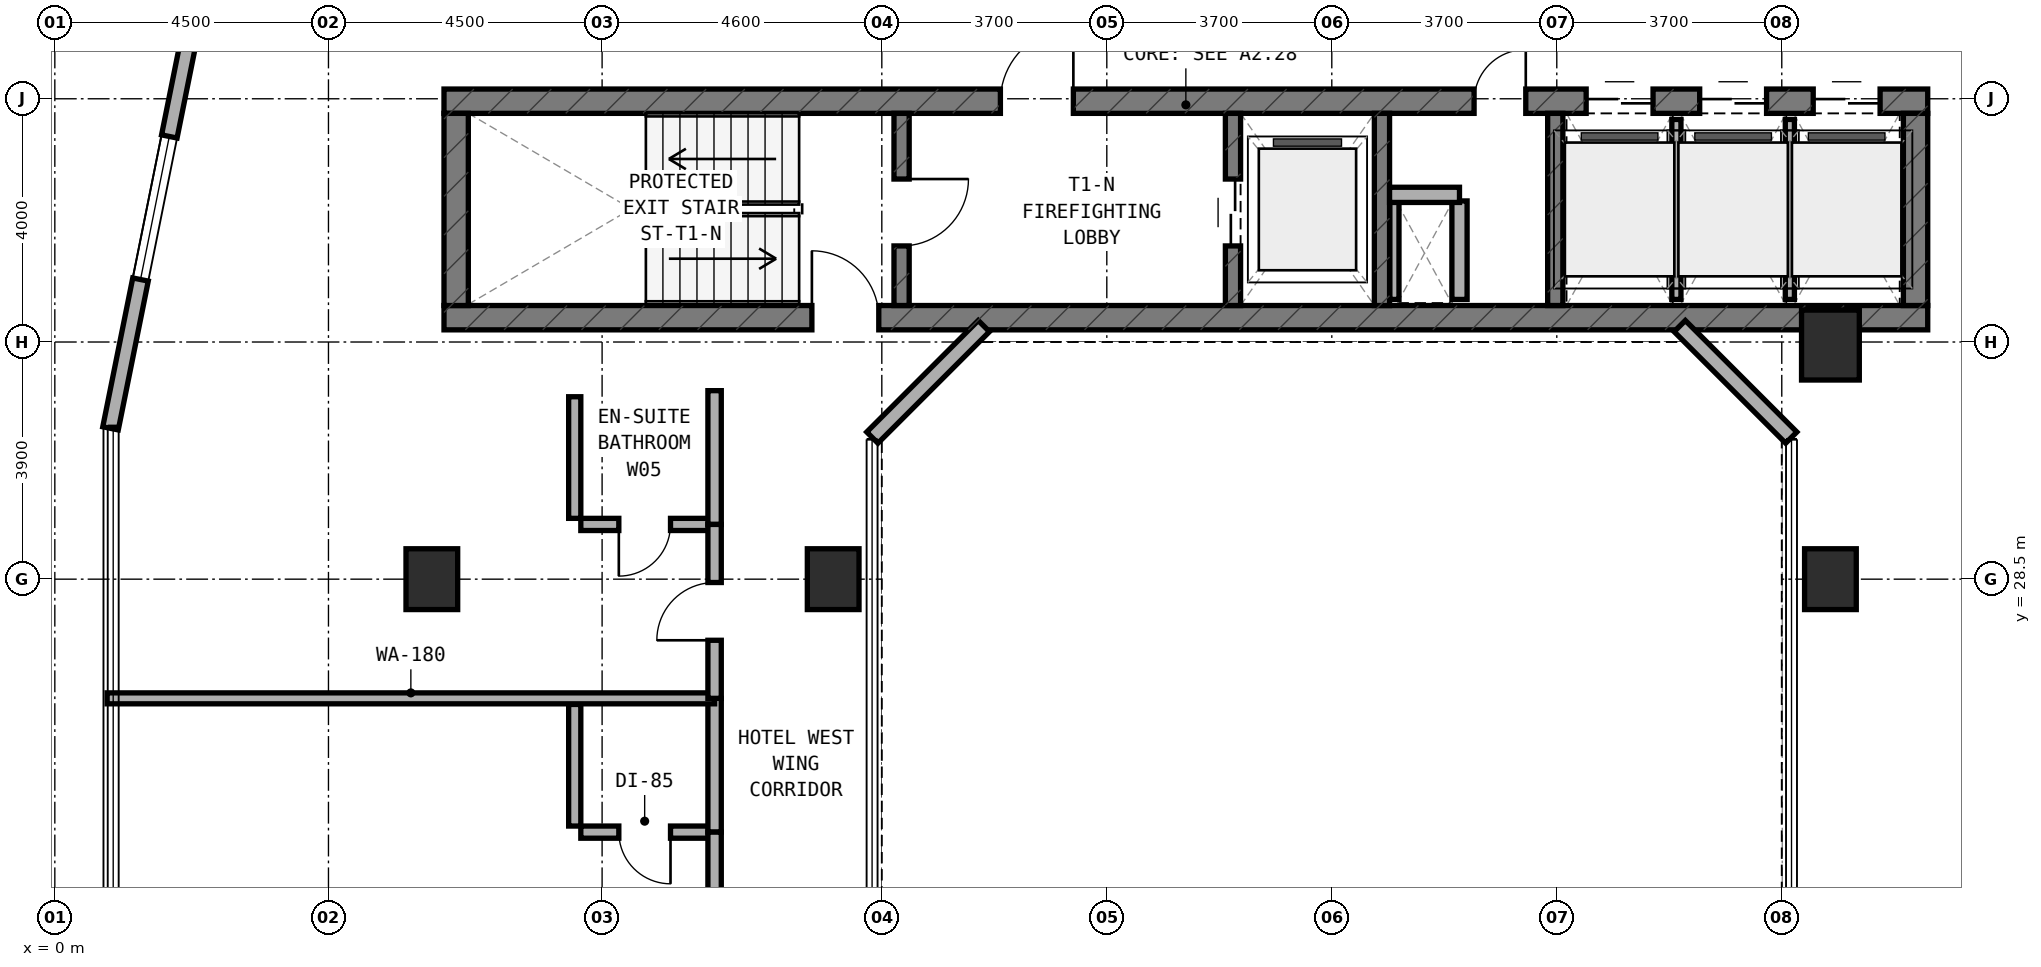
"""IFC4 building model, lengths in metres.
Left out: names, types, materials, properties, quantities, classifications, styles, units other than length and angle.
Written with IfcOpenShell. Run it as: python <this file> out.ifc"""

import sys

from ifc_helpers import new_model, si_unit, direction, frame, frame_2d, origin, origin_2d, place, context, subcontext, project, spatial, rectangle, extrude, element, fill, save


model = new_model("IFC4")
c1 = context("Model", 3, precision=1e-05, world=origin(), true_north=direction((0.0, 1.0)))
c2 = subcontext(c1, "Body", "Model", "MODEL_VIEW")
j1 = project(units=[si_unit("LENGTHUNIT", "METRE"), si_unit("PLANEANGLEUNIT", "RADIAN")], contexts=[c1])
p1 = place(None, origin())
s1 = spatial("IfcSite", under=j1, at=p1, CompositionType="ELEMENT")
p2 = place(p1, origin())
s2 = spatial("IfcBuilding", under=s1, at=p2, CompositionType="ELEMENT")
p3 = place(p2, frame((0.0, 0.0, 124.0)))
s3 = spatial("IfcBuildingStorey", under=s2, at=p3, CompositionType="ELEMENT", Elevation=124.0)
p4 = place(p3, frame((6.4, 32.8, 0.0), z_axis=(0.0, 0.0, 1.0), x_axis=(1.0, 0.0, 0.0)))
e1 = element("IfcWall", 1, at=p4, inside=s3, PredefinedType="SHEAR", context=c2, shape_type="SweptSolid", body=[
    extrude(rectangle(XDim=24.4, YDim=0.4, at=frame_2d((12.2, 0.0))), origin(), (0.0, 0.0, 1.0), 3.5),
])
p5 = place(p4, frame((6.05, 0.0, 0.0)))
e2 = element("IfcOpeningElement", 2, at=p5, cuts=e1, PredefinedType="OPENING", context=c2, shape_type="SweptSolid", body=[
    extrude(rectangle(XDim=1.1, YDim=2.15, at=frame_2d((0.55, 1.075))), frame((0.0, 0.21, 0.0), z_axis=(0.0, -1.0, 0.0), x_axis=(1.0, 0.0, 0.0)), (0.0, 0.0, 1.0), 0.42),
])
p6 = place(p3, frame((6.4, 36.36, 0.0), z_axis=(0.0, 0.0, 1.0), x_axis=(1.0, 0.0, 0.0)))
e3 = element("IfcWall", 3, at=p6, inside=s3, PredefinedType="SHEAR", context=c2, shape_type="SweptSolid", body=[
    extrude(rectangle(XDim=24.4, YDim=0.4, at=frame_2d((12.2, 0.0))), origin(), (0.0, 0.0, 1.0), 3.5),
])
p7 = place(p6, frame((9.15, 0.0, 0.0)))
e4 = element("IfcOpeningElement", 4, at=p7, cuts=e3, PredefinedType="OPENING", context=c2, shape_type="SweptSolid", body=[
    extrude(rectangle(XDim=1.2, YDim=2.15, at=frame_2d((0.6, 1.075))), frame((0.0, 0.21, 0.0), z_axis=(0.0, -1.0, 0.0), x_axis=(1.0, 0.0, 0.0)), (0.0, 0.0, 1.0), 0.42),
])
p8 = place(p6, frame((16.94, 0.0, 0.0)))
e5 = element("IfcOpeningElement", 5, at=p8, cuts=e3, PredefinedType="OPENING", context=c2, shape_type="SweptSolid", body=[
    extrude(rectangle(XDim=0.85, YDim=2.1, at=frame_2d((0.425, 1.05))), frame((0.0, 0.21, 0.0), z_axis=(0.0, -1.0, 0.0), x_axis=(1.0, 0.0, 0.0)), (0.0, 0.0, 1.0), 0.42),
])
p9 = place(p6, frame((18.783, 0.0, 0.0)))
e6 = element("IfcOpeningElement", 6, at=p9, cuts=e3, PredefinedType="OPENING", context=c2, shape_type="SweptSolid", body=[
    extrude(rectangle(XDim=1.1, YDim=2.15, at=frame_2d((0.55, 1.075))), frame((0.0, 0.21, 0.0), z_axis=(0.0, -1.0, 0.0), x_axis=(1.0, 0.0, 0.0)), (0.0, 0.0, 1.0), 0.42),
])
p10 = place(p6, frame((20.65, 0.0, 0.0)))
e7 = element("IfcOpeningElement", 7, at=p10, cuts=e3, PredefinedType="OPENING", context=c2, shape_type="SweptSolid", body=[
    extrude(rectangle(XDim=1.1, YDim=2.15, at=frame_2d((0.55, 1.075))), frame((0.0, 0.21, 0.0), z_axis=(0.0, -1.0, 0.0), x_axis=(1.0, 0.0, 0.0)), (0.0, 0.0, 1.0), 0.42),
])
p11 = place(p6, frame((22.517, 0.0, 0.0)))
e8 = element("IfcOpeningElement", 8, at=p11, cuts=e3, PredefinedType="OPENING", context=c2, shape_type="SweptSolid", body=[
    extrude(rectangle(XDim=1.1, YDim=2.15, at=frame_2d((0.55, 1.075))), frame((0.0, 0.21, 0.0), z_axis=(0.0, -1.0, 0.0), x_axis=(1.0, 0.0, 0.0)), (0.0, 0.0, 1.0), 0.42),
])
for number, where, z_axis, x_axis in (
    (9, (6.6, 33.0, 0.0), (0.0, 0.0, 1.0), (0.0, 1.0, 0.0)),
    (10, (30.6, 33.0, 0.0), (0.0, 0.0, 1.0), (0.0, 1.0, 0.0)),
):
    element("IfcWall", number, at=place(p3, frame(where, z_axis=z_axis, x_axis=x_axis)), inside=s3, PredefinedType="SHEAR", context=c2, shape_type="SweptSolid", body=[
        extrude(rectangle(XDim=3.16, YDim=0.4, at=frame_2d((1.58, 0.0))), origin(), (0.0, 0.0, 1.0), 3.5),
    ])
p12 = place(p3, frame((13.925, 33.0, 0.0), z_axis=(0.0, 0.0, 1.0), x_axis=(0.0, 1.0, 0.0)))
e11 = element("IfcWall", 11, at=p12, inside=s3, PredefinedType="STANDARD", context=c2, shape_type="SweptSolid", body=[
    extrude(rectangle(XDim=3.16, YDim=0.25, at=frame_2d((1.58, 0.0))), origin(), (0.0, 0.0, 1.0), 3.22),
])
p13 = place(p12, frame((0.98, 0.0, 0.0)))
e12 = element("IfcOpeningElement", 12, at=p13, cuts=e11, PredefinedType="OPENING", context=c2, shape_type="SweptSolid", body=[
    extrude(rectangle(XDim=1.1, YDim=2.15, at=frame_2d((0.55, 1.075))), frame((0.0, 0.135, 0.0), z_axis=(0.0, -1.0, 0.0), x_axis=(1.0, 0.0, 0.0)), (0.0, 0.0, 1.0), 0.27),
])
p14 = place(p3, frame((19.375, 33.0, 0.0), z_axis=(0.0, 0.0, 1.0), x_axis=(0.0, 1.0, 0.0)))
e13 = element("IfcWall", 13, at=p14, inside=s3, PredefinedType="STANDARD", context=c2, shape_type="SweptSolid", body=[
    extrude(rectangle(XDim=3.16, YDim=0.25, at=frame_2d((1.58, 0.0))), origin(), (0.0, 0.0, 1.0), 3.22),
])
p15 = place(p14, frame((0.98, 0.0, 0.0)))
e14 = element("IfcOpeningElement", 14, at=p15, cuts=e13, PredefinedType="OPENING", context=c2, shape_type="SweptSolid", body=[
    extrude(rectangle(XDim=1.1, YDim=2.15, at=frame_2d((0.55, 1.075))), frame((0.0, 0.135, 0.0), z_axis=(0.0, -1.0, 0.0), x_axis=(1.0, 0.0, 0.0)), (0.0, 0.0, 1.0), 0.27),
])
for number, where, z_axis, x_axis in (
    (15, (21.825, 33.0, 0.0), (0.0, 0.0, 1.0), (0.0, 1.0, 0.0)),
    (16, (24.675, 33.0, 0.0), (0.0, 0.0, 1.0), (0.0, 1.0, 0.0)),
):
    element("IfcWall", number, at=place(p3, frame(where, z_axis=z_axis, x_axis=x_axis)), inside=s3, PredefinedType="STANDARD", context=c2, shape_type="SweptSolid", body=[
        extrude(rectangle(XDim=3.16, YDim=0.25, at=frame_2d((1.58, 0.0))), origin(), (0.0, 0.0, 1.0), 3.22),
    ])
for number, where, z_axis, x_axis in (
    (17, (6.2, 28.5, 0.0), (0.0, 0.0, 1.0), (1.0, 0.0, 0.0)),
    (18, (12.8, 28.5, 0.0), (0.0, 0.0, 1.0), (1.0, 0.0, 0.0)),
):
    element("IfcColumn", number, at=place(p3, frame(where, z_axis=z_axis, x_axis=x_axis)), inside=s3, PredefinedType="COLUMN", context=c2, shape_type="SweptSolid", body=[
        extrude(rectangle(XDim=0.85, YDim=1.0, at=origin_2d()), origin(), (0.0, 0.0, 1.0), 3.5),
    ])
p16 = place(p3, frame((29.2, 32.35, 0.0), z_axis=(0.0, 0.0, 1.0), x_axis=(1.0, 0.0, 0.0)))
e19 = element("IfcColumn", 19, at=p16, inside=s3, PredefinedType="COLUMN", context=c2, shape_type="SweptSolid", body=[
    extrude(rectangle(XDim=0.95, YDim=1.15, at=origin_2d()), origin(), (0.0, 0.0, 1.0), 3.5),
])
p17 = place(p3, frame((29.2, 28.5, 0.0), z_axis=(0.0, 0.0, 1.0), x_axis=(1.0, 0.0, 0.0)))
e20 = element("IfcColumn", 20, at=p17, inside=s3, PredefinedType="COLUMN", context=c2, shape_type="SweptSolid", body=[
    extrude(rectangle(XDim=0.85, YDim=1.0, at=origin_2d()), origin(), (0.0, 0.0, 1.0), 3.5),
])
p18 = place(p3, frame((2.729, 39.982, 0.0), z_axis=(0.0, 0.0, 1.0), x_axis=(-0.197435082048, -0.980315963543, 0.0)))
e21 = element("IfcWall", 21, at=p18, inside=s3, PredefinedType="STANDARD", context=c2, shape_type="SweptSolid", body=[
    extrude(rectangle(XDim=9.183, YDim=0.26, at=frame_2d((4.591, 0.0))), origin(), (0.0, 0.0, 1.0), 3.22),
])
p19 = place(p18, frame((4.286, 0.0, 0.8)))
e22 = element("IfcOpeningElement", 22, at=p19, cuts=e21, PredefinedType="OPENING", context=c2, shape_type="SweptSolid", body=[
    extrude(rectangle(XDim=2.4, YDim=1.6, at=frame_2d((1.2, 0.8))), frame((0.0, 0.14, 0.0), z_axis=(0.0, -1.0, 0.0), x_axis=(1.0, 0.0, 0.0)), (0.0, 0.0, 1.0), 0.28),
])
for number, where, z_axis, x_axis in (
    (23, (28.556, 30.828, 0.0), (0.0, 0.0, 1.0), (-0.707, 0.707, 0.0)),
    (24, (15.278, 32.662, 0.0), (0.0, 0.0, 1.0), (-0.707, -0.707, 0.0)),
):
    element("IfcWall", number, at=place(p3, frame(where, z_axis=z_axis, x_axis=x_axis)), inside=s3, PredefinedType="STANDARD", context=c2, shape_type="SweptSolid", body=[
        extrude(rectangle(XDim=2.594, YDim=0.26, at=frame_2d((1.297, 0.0))), origin(), (0.0, 0.0, 1.0), 3.22),
    ])
p20 = place(p3, frame((22.03, 33.1, 0.0), z_axis=(0.0, 0.0, 1.0), x_axis=(0.0, 1.0, 0.0)))
e25 = element("IfcWall", 25, at=p20, inside=s3, PredefinedType="PARTITIONING", context=c2, shape_type="SweptSolid", body=[
    extrude(rectangle(XDim=1.62, YDim=0.15, at=frame_2d((0.81, 0.0))), origin(), (0.0, 0.0, 1.0), 3.22),
])
p21 = place(p3, frame((23.1, 33.1, 0.0), z_axis=(0.0, 0.0, 1.0), x_axis=(0.0, 1.0, 0.0)))
e26 = element("IfcWall", 26, at=p21, inside=s3, PredefinedType="SOLIDWALL", context=c2, shape_type="SweptSolid", body=[
    extrude(rectangle(XDim=1.62, YDim=0.25, at=frame_2d((0.81, 0.0))), origin(), (0.0, 0.0, 1.0), 3.22),
])
p22 = place(p3, frame((21.95, 34.82, 0.0), z_axis=(0.0, 0.0, 1.0), x_axis=(1.0, 0.0, 0.0)))
e27 = element("IfcWall", 27, at=p22, inside=s3, PredefinedType="SOLIDWALL", context=c2, shape_type="SweptSolid", body=[
    extrude(rectangle(XDim=1.15, YDim=0.25, at=frame_2d((0.575, 0.0))), origin(), (0.0, 0.0, 1.0), 3.22),
])
p23 = place(p3, frame((26.667, 33.1, 0.0), z_axis=(0.0, 0.0, 1.0), x_axis=(0.0, 1.0, 0.0)))
e28 = element("IfcWall", 28, at=p23, inside=s3, PredefinedType="PARTITIONING", context=c2, shape_type="SweptSolid", body=[
    extrude(rectangle(XDim=2.96, YDim=0.15, at=frame_2d((1.48, 0.0))), origin(), (0.0, 0.0, 1.0), 3.22),
])
p24 = place(p3, frame((28.533, 33.1, 0.0), z_axis=(0.0, 0.0, 1.0), x_axis=(0.0, 1.0, 0.0)))
e29 = element("IfcWall", 29, at=p24, inside=s3, PredefinedType="PARTITIONING", context=c2, shape_type="SweptSolid", body=[
    extrude(rectangle(XDim=2.96, YDim=0.15, at=frame_2d((1.48, 0.0))), origin(), (0.0, 0.0, 1.0), 2.695),
])
p25 = place(p3, frame((8.65, 24.34, 0.0), z_axis=(0.0, 0.0, 1.0), x_axis=(1.0, 0.0, 0.0)))
e30 = element("IfcWall", 30, at=p25, inside=s3, PredefinedType="PLUMBINGWALL", context=c2, shape_type="SweptSolid", body=[
    extrude(rectangle(XDim=2.1, YDim=0.2, at=frame_2d((1.05, 0.0))), origin(), (0.0, 0.0, 1.0), 3.22),
])
p26 = place(p25, frame((0.625, 0.0, 0.0)))
e31 = element("IfcOpeningElement", 31, at=p26, cuts=e30, PredefinedType="OPENING", context=c2, shape_type="SweptSolid", body=[
    extrude(rectangle(XDim=0.85, YDim=2.1, at=frame_2d((0.425, 1.05))), frame((0.0, 0.11, 0.0), z_axis=(0.0, -1.0, 0.0), x_axis=(1.0, 0.0, 0.0)), (0.0, 0.0, 1.0), 0.22),
])
p27 = place(p3, frame((8.55, 24.44, 0.0), z_axis=(0.0, 0.0, 1.0), x_axis=(0.0, 1.0, 0.0)))
e32 = element("IfcWall", 32, at=p27, inside=s3, PredefinedType="PLUMBINGWALL", context=c2, shape_type="SweptSolid", body=[
    extrude(rectangle(XDim=2.0, YDim=0.2, at=frame_2d((1.0, 0.0))), origin(), (0.0, 0.0, 1.0), 3.22),
])
p28 = place(p3, frame((10.85, 24.34, 0.0), z_axis=(0.0, 0.0, 1.0), x_axis=(0.0, 1.0, 0.0)))
e33 = element("IfcWall", 33, at=p28, inside=s3, PredefinedType="SOLIDWALL", context=c2, shape_type="SweptSolid", body=[
    extrude(rectangle(XDim=2.2, YDim=0.22, at=frame_2d((1.1, 0.0))), origin(), (0.0, 0.0, 1.0), 3.22),
])
p29 = place(p3, frame((10.85, 18.4, 0.0), z_axis=(0.0, 0.0, 1.0), x_axis=(0.0, 1.0, 0.0)))
e34 = element("IfcWall", 34, at=p29, inside=s3, PredefinedType="SOLIDWALL", context=c2, shape_type="SweptSolid", body=[
    extrude(rectangle(XDim=5.94, YDim=0.22, at=frame_2d((2.97, 0.0))), origin(), (0.0, 0.0, 1.0), 2.695),
])
p30 = place(p29, frame((2.495, 0.0, 0.0)))
e35 = element("IfcOpeningElement", 35, at=p30, cuts=e34, PredefinedType="OPENING", context=c2, shape_type="SweptSolid", body=[
    extrude(rectangle(XDim=0.95, YDim=2.1, at=frame_2d((0.475, 1.05))), frame((0.0, 0.12, 0.0), z_axis=(0.0, -1.0, 0.0), x_axis=(1.0, 0.0, 0.0)), (0.0, 0.0, 1.0), 0.24),
])
p31 = place(p3, frame((0.86, 26.54, 0.0), z_axis=(0.0, 0.0, 1.0), x_axis=(1.0, 0.0, 0.0)))
e36 = element("IfcWall", 36, at=p31, inside=s3, PredefinedType="SOLIDWALL", context=c2, shape_type="SweptSolid", body=[
    extrude(rectangle(XDim=9.99, YDim=0.18, at=frame_2d((4.995, 0.0))), origin(), (0.0, 0.0, 1.0), 2.835),
])
p32 = place(p3, frame((8.65, 29.4, 0.0), z_axis=(0.0, 0.0, 1.0), x_axis=(1.0, 0.0, 0.0)))
e37 = element("IfcWall", 37, at=p32, inside=s3, PredefinedType="PLUMBINGWALL", context=c2, shape_type="SweptSolid", body=[
    extrude(rectangle(XDim=2.1, YDim=0.2, at=frame_2d((1.05, 0.0))), origin(), (0.0, 0.0, 1.0), 3.22),
])
p33 = place(p32, frame((0.625, 0.0, 0.0)))
e38 = element("IfcOpeningElement", 38, at=p33, cuts=e37, PredefinedType="OPENING", context=c2, shape_type="SweptSolid", body=[
    extrude(rectangle(XDim=0.85, YDim=2.1, at=frame_2d((0.425, 1.05))), frame((0.0, 0.11, 0.0), z_axis=(0.0, -1.0, 0.0), x_axis=(1.0, 0.0, 0.0)), (0.0, 0.0, 1.0), 0.22),
])
p34 = place(p3, frame((8.55, 29.5, 0.0), z_axis=(0.0, 0.0, 1.0), x_axis=(0.0, 1.0, 0.0)))
e39 = element("IfcWall", 39, at=p34, inside=s3, PredefinedType="PLUMBINGWALL", context=c2, shape_type="SweptSolid", body=[
    extrude(rectangle(XDim=2.0, YDim=0.2, at=frame_2d((1.0, 0.0))), origin(), (0.0, 0.0, 1.0), 3.22),
])
p35 = place(p3, frame((10.85, 29.4, 0.0), z_axis=(0.0, 0.0, 1.0), x_axis=(0.0, 1.0, 0.0)))
e40 = element("IfcWall", 40, at=p35, inside=s3, PredefinedType="SOLIDWALL", context=c2, shape_type="SweptSolid", body=[
    extrude(rectangle(XDim=2.2, YDim=0.22, at=frame_2d((1.1, 0.0))), origin(), (0.0, 0.0, 1.0), 3.22),
])
p36 = place(p3, frame((10.85, 26.54, 0.0), z_axis=(0.0, 0.0, 1.0), x_axis=(0.0, 1.0, 0.0)))
e41 = element("IfcWall", 41, at=p36, inside=s3, PredefinedType="SOLIDWALL", context=c2, shape_type="SweptSolid", body=[
    extrude(rectangle(XDim=2.86, YDim=0.22, at=frame_2d((1.43, 0.0))), origin(), (0.0, 0.0, 1.0), 2.695),
])
p37 = place(p36, frame((0.955, 0.0, 0.0)))
e42 = element("IfcOpeningElement", 42, at=p37, cuts=e41, PredefinedType="OPENING", context=c2, shape_type="SweptSolid", body=[
    extrude(rectangle(XDim=0.95, YDim=2.1, at=frame_2d((0.475, 1.05))), frame((0.0, 0.12, 0.0), z_axis=(0.0, -1.0, 0.0), x_axis=(1.0, 0.0, 0.0)), (0.0, 0.0, 1.0), 0.24),
])
p38 = place(p19, origin())
e43 = element("IfcWindow", 43, at=p38, inside=s3, PartitioningType="SINGLE_PANEL", PredefinedType="WINDOW", context=c2, shape_type="SweptSolid", body=[
    extrude(rectangle(XDim=2.4, YDim=1.6, at=frame_2d((1.2, 0.8))), frame((0.0, 0.03, 0.0), z_axis=(0.0, -1.0, 0.0), x_axis=(1.0, 0.0, 0.0)), (0.0, 0.0, 1.0), 0.06),
])
fill(e22, e43)
p39 = place(p13, frame((1.1, 0.0, 0.0), z_axis=(0.0, 0.0, 1.0), x_axis=(-1.0, 0.0, 0.0)))
e44 = element("IfcDoor", 44, at=p39, inside=s3, OperationType="SINGLE_SWING_LEFT", PredefinedType="DOOR", context=c2, shape_type="SweptSolid", body=[
    extrude(rectangle(XDim=1.1, YDim=2.15, at=frame_2d((0.55, 1.075))), frame((0.0, 0.025, 0.0), z_axis=(0.0, -1.0, 0.0), x_axis=(1.0, 0.0, 0.0)), (0.0, 0.0, 1.0), 0.05),
])
fill(e12, e44)
p40 = place(p7, origin())
e45 = element("IfcDoor", 45, at=p40, inside=s3, OperationType="SINGLE_SWING_RIGHT", PredefinedType="DOOR", context=c2, shape_type="SweptSolid", body=[
    extrude(rectangle(XDim=1.2, YDim=2.15, at=frame_2d((0.6, 1.075))), frame((0.0, 0.025, 0.0), z_axis=(0.0, -1.0, 0.0), x_axis=(1.0, 0.0, 0.0)), (0.0, 0.0, 1.0), 0.05),
])
fill(e4, e45)
p41 = place(p15, origin())
e46 = element("IfcDoor", 46, at=p41, inside=s3, OperationType="DOUBLE_DOOR_SLIDING", PredefinedType="DOOR", context=c2, shape_type="SweptSolid", body=[
    extrude(rectangle(XDim=1.1, YDim=2.15, at=frame_2d((0.55, 1.075))), frame((0.0, 0.025, 0.0), z_axis=(0.0, -1.0, 0.0), x_axis=(1.0, 0.0, 0.0)), (0.0, 0.0, 1.0), 0.05),
])
fill(e14, e46)
p42 = place(p8, origin())
e47 = element("IfcDoor", 47, at=p42, inside=s3, OperationType="SINGLE_SWING_RIGHT", PredefinedType="DOOR", context=c2, shape_type="SweptSolid", body=[
    extrude(rectangle(XDim=0.85, YDim=2.1, at=frame_2d((0.425, 1.05))), frame((0.0, 0.025, 0.0), z_axis=(0.0, -1.0, 0.0), x_axis=(1.0, 0.0, 0.0)), (0.0, 0.0, 1.0), 0.05),
])
fill(e5, e47)
p43 = place(p9, origin())
e48 = element("IfcDoor", 48, at=p43, inside=s3, OperationType="DOUBLE_DOOR_SLIDING", PredefinedType="DOOR", context=c2, shape_type="SweptSolid", body=[
    extrude(rectangle(XDim=1.1, YDim=2.15, at=frame_2d((0.55, 1.075))), frame((0.0, 0.025, 0.0), z_axis=(0.0, -1.0, 0.0), x_axis=(1.0, 0.0, 0.0)), (0.0, 0.0, 1.0), 0.05),
])
fill(e6, e48)
p44 = place(p10, origin())
e49 = element("IfcDoor", 49, at=p44, inside=s3, OperationType="DOUBLE_DOOR_SLIDING", PredefinedType="DOOR", context=c2, shape_type="SweptSolid", body=[
    extrude(rectangle(XDim=1.1, YDim=2.15, at=frame_2d((0.55, 1.075))), frame((0.0, 0.025, 0.0), z_axis=(0.0, -1.0, 0.0), x_axis=(1.0, 0.0, 0.0)), (0.0, 0.0, 1.0), 0.05),
])
fill(e7, e49)
p45 = place(p11, origin())
e50 = element("IfcDoor", 50, at=p45, inside=s3, OperationType="DOUBLE_DOOR_SLIDING", PredefinedType="DOOR", context=c2, shape_type="SweptSolid", body=[
    extrude(rectangle(XDim=1.1, YDim=2.15, at=frame_2d((0.55, 1.075))), frame((0.0, 0.025, 0.0), z_axis=(0.0, -1.0, 0.0), x_axis=(1.0, 0.0, 0.0)), (0.0, 0.0, 1.0), 0.05),
])
fill(e8, e50)
p46 = place(p5, origin())
e51 = element("IfcDoor", 51, at=p46, inside=s3, OperationType="SINGLE_SWING_LEFT", PredefinedType="DOOR", context=c2, shape_type="SweptSolid", body=[
    extrude(rectangle(XDim=1.1, YDim=2.15, at=frame_2d((0.55, 1.075))), frame((0.0, 0.025, 0.0), z_axis=(0.0, -1.0, 0.0), x_axis=(1.0, 0.0, 0.0)), (0.0, 0.0, 1.0), 0.05),
])
fill(e2, e51)
p47 = place(p26, frame((0.85, 0.0, 0.0), z_axis=(0.0, 0.0, 1.0), x_axis=(-1.0, 0.0, 0.0)))
e52 = element("IfcDoor", 52, at=p47, inside=s3, OperationType="SINGLE_SWING_LEFT", PredefinedType="DOOR", context=c2, shape_type="SweptSolid", body=[
    extrude(rectangle(XDim=0.85, YDim=2.1, at=frame_2d((0.425, 1.05))), frame((0.0, 0.025, 0.0), z_axis=(0.0, -1.0, 0.0), x_axis=(1.0, 0.0, 0.0)), (0.0, 0.0, 1.0), 0.05),
])
fill(e31, e52)
p48 = place(p33, frame((0.85, 0.0, 0.0), z_axis=(0.0, 0.0, 1.0), x_axis=(-1.0, 0.0, 0.0)))
e53 = element("IfcDoor", 53, at=p48, inside=s3, OperationType="SINGLE_SWING_RIGHT", PredefinedType="DOOR", context=c2, shape_type="SweptSolid", body=[
    extrude(rectangle(XDim=0.85, YDim=2.1, at=frame_2d((0.425, 1.05))), frame((0.0, 0.025, 0.0), z_axis=(0.0, -1.0, 0.0), x_axis=(1.0, 0.0, 0.0)), (0.0, 0.0, 1.0), 0.05),
])
fill(e38, e53)
p49 = place(p37, origin())
e54 = element("IfcDoor", 54, at=p49, inside=s3, OperationType="SINGLE_SWING_LEFT", PredefinedType="DOOR", context=c2, shape_type="SweptSolid", body=[
    extrude(rectangle(XDim=0.95, YDim=2.1, at=frame_2d((0.475, 1.05))), frame((0.0, 0.025, 0.0), z_axis=(0.0, -1.0, 0.0), x_axis=(1.0, 0.0, 0.0)), (0.0, 0.0, 1.0), 0.05),
])
fill(e42, e54)
save(model, sys.argv[1])
